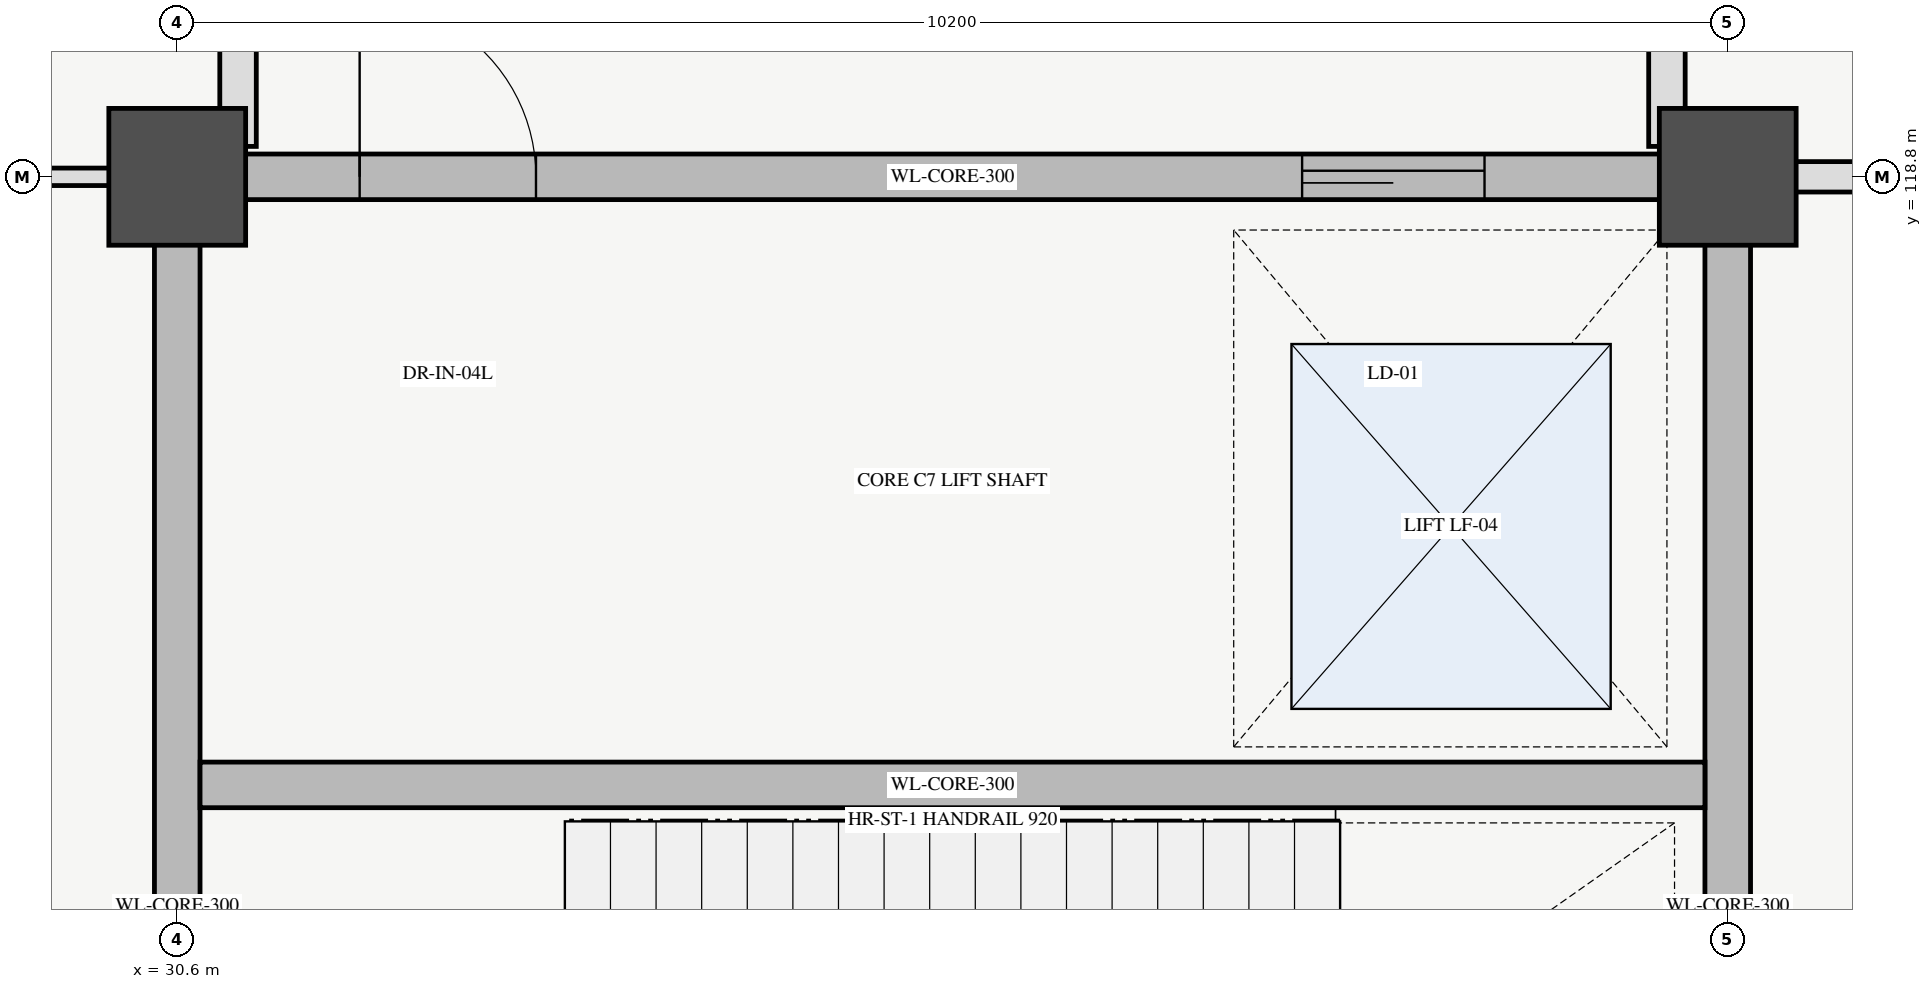
"""IFC4 building model, lengths in metres.
Left out: names, types, materials, properties, quantities, classifications, styles, units other than length and angle.
Written with IfcOpenShell. Run it as: python <this file> out.ifc"""

import sys

from ifc_helpers import new_model, si_unit, direction, frame, frame_2d, origin, origin_2d, place, context, subcontext, project, spatial, rectangle, extrude, element, fill, save


model = new_model("IFC4")
c1 = context("Model", 3, precision=1e-05, world=origin(), true_north=direction((0.0, 1.0)))
c2 = subcontext(c1, "Body", "Model", "MODEL_VIEW")
j1 = project(units=[si_unit("LENGTHUNIT", "METRE"), si_unit("PLANEANGLEUNIT", "RADIAN")], contexts=[c1])
p1 = place(None, origin())
s1 = spatial("IfcSite", under=j1, at=p1, CompositionType="ELEMENT")
p2 = place(p1, origin())
s2 = spatial("IfcBuilding", under=s1, at=p2, CompositionType="ELEMENT")
p3 = place(p2, frame((0.0, 0.0, 5.4)))
s3 = spatial("IfcBuildingStorey", under=s2, at=p3, CompositionType="ELEMENT", Elevation=5.4)
for number, where, z_axis, x_axis in (
    (1, (30.6, 118.8, 0.0), (0.0, 0.0, 1.0), (1.0, 0.0, 0.0)),
    (2, (40.8, 118.8, 0.0), (0.0, 0.0, 1.0), (1.0, 0.0, 0.0)),
):
    element("IfcColumn", number, at=place(p3, frame(where, z_axis=z_axis, x_axis=x_axis)), inside=s3, PredefinedType="COLUMN", context=c2, shape_type="SweptSolid", body=[
        extrude(rectangle(XDim=0.9, YDim=0.9, at=origin_2d()), origin(), (0.0, 0.0, 1.0), 5.4),
    ])
p4 = place(p3, frame((30.6, 118.8, 0.0), z_axis=(0.0, 0.0, 1.0), x_axis=(1.0, 0.0, 0.0)))
e3 = element("IfcWall", 3, at=p4, inside=s3, PredefinedType="SHEAR", context=c2, shape_type="SweptSolid", body=[
    extrude(rectangle(XDim=10.2, YDim=0.3, at=frame_2d((5.1, 0.0))), origin(), (0.0, 0.0, 1.0), 5.4),
])
p5 = place(p4, frame((1.2, 0.0, 0.0)))
e4 = element("IfcOpeningElement", 4, at=p5, cuts=e3, PredefinedType="OPENING", context=c2, shape_type="SweptSolid", body=[
    extrude(rectangle(XDim=1.16, YDim=2.2, at=frame_2d((0.58, 1.1))), frame((0.0, 0.16, 0.0), z_axis=(0.0, -1.0, 0.0), x_axis=(1.0, 0.0, 0.0)), (0.0, 0.0, 1.0), 0.32),
])
p6 = place(p4, frame((7.4, 0.0, 0.0)))
e5 = element("IfcOpeningElement", 5, at=p6, cuts=e3, PredefinedType="OPENING", context=c2, shape_type="SweptSolid", body=[
    extrude(rectangle(XDim=1.2, YDim=2.25, at=frame_2d((0.6, 1.125))), frame((0.0, 0.16, 0.0), z_axis=(0.0, -1.0, 0.0), x_axis=(1.0, 0.0, 0.0)), (0.0, 0.0, 1.0), 0.32),
])
for number, where, z_axis, x_axis in (
    (6, (30.6, 109.2, 0.0), (0.0, 0.0, 1.0), (0.0, 1.0, 0.0)),
    (7, (40.8, 109.2, 0.0), (0.0, 0.0, 1.0), (0.0, 1.0, 0.0)),
):
    element("IfcWall", number, at=place(p3, frame(where, z_axis=z_axis, x_axis=x_axis)), inside=s3, PredefinedType="SHEAR", context=c2, shape_type="SweptSolid", body=[
        extrude(rectangle(XDim=9.6, YDim=0.3, at=frame_2d((4.8, 0.0))), origin(), (0.0, 0.0, 1.0), 5.4),
    ])
p7 = place(p3, frame((30.75, 114.8, 0.0), z_axis=(0.0, 0.0, 1.0), x_axis=(1.0, 0.0, 0.0)))
e8 = element("IfcWall", 8, at=p7, inside=s3, PredefinedType="SHEAR", context=c2, shape_type="SweptSolid", body=[
    extrude(rectangle(XDim=9.9, YDim=0.3, at=frame_2d((4.95, 0.0))), origin(), (0.0, 0.0, 1.0), 5.4),
])
for number, where, z_axis, x_axis in (
    (9, (40.4, 119.0, 0.0), (0.0, 0.0, 1.0), (0.0, 1.0, 0.0)),
    (10, (31.0, 119.0, 0.0), (0.0, 0.0, 1.0), (0.0, 1.0, 0.0)),
):
    element("IfcWall", number, at=place(p3, frame(where, z_axis=z_axis, x_axis=x_axis)), inside=s3, PredefinedType="PARTITIONING", context=c2, shape_type="SweptSolid", body=[
        extrude(rectangle(XDim=4.6, YDim=0.24, at=frame_2d((2.3, 0.0))), origin(), (0.0, 0.0, 1.0), 4.2),
    ])
p8 = place(p3, frame((41.2, 118.8, 0.0), z_axis=(0.0, 0.0, 1.0), x_axis=(1.0, 0.0, 0.0)))
e11 = element("IfcWall", 11, at=p8, inside=s3, PredefinedType="PARTITIONING", context=c2, shape_type="SweptSolid", body=[
    extrude(rectangle(XDim=9.4, YDim=0.2, at=frame_2d((4.7, 0.0))), origin(), (0.0, 0.0, 1.0), 4.2),
])
p9 = place(p8, frame((4.22, 0.0, 0.0)))
e12 = element("IfcOpeningElement", 12, at=p9, cuts=e11, PredefinedType="OPENING", context=c2, shape_type="SweptSolid", body=[
    extrude(rectangle(XDim=0.96, YDim=2.1, at=frame_2d((0.48, 1.05))), frame((0.0, 0.11, 0.0), z_axis=(0.0, -1.0, 0.0), x_axis=(1.0, 0.0, 0.0)), (0.0, 0.0, 1.0), 0.22),
])
p10 = place(p3, frame((20.8, 118.8, 0.0), z_axis=(0.0, 0.0, 1.0), x_axis=(1.0, 0.0, 0.0)))
e13 = element("IfcWall", 13, at=p10, inside=s3, PredefinedType="PARTITIONING", context=c2, shape_type="SweptSolid", body=[
    extrude(rectangle(XDim=9.4, YDim=0.115, at=frame_2d((4.7, 0.0))), origin(), (0.0, 0.0, 1.0), 4.2),
])
p11 = place(p10, frame((4.26, 0.0, 0.0)))
e14 = element("IfcOpeningElement", 14, at=p11, cuts=e13, PredefinedType="OPENING", context=c2, shape_type="SweptSolid", body=[
    extrude(rectangle(XDim=0.88, YDim=2.08, at=frame_2d((0.44, 1.04))), frame((0.0, 0.067, 0.0), z_axis=(0.0, -1.0, 0.0), x_axis=(1.0, 0.0, 0.0)), (0.0, 0.0, 1.0), 0.135),
])
p12 = place(p5, origin())
e15 = element("IfcDoor", 15, at=p12, inside=s3, OperationType="SINGLE_SWING_LEFT", PredefinedType="DOOR", context=c2, shape_type="SweptSolid", body=[
    extrude(rectangle(XDim=1.16, YDim=2.2, at=frame_2d((0.58, 1.1))), frame((0.0, 0.025, 0.0), z_axis=(0.0, -1.0, 0.0), x_axis=(1.0, 0.0, 0.0)), (0.0, 0.0, 1.0), 0.05),
])
fill(e4, e15)
p13 = place(p6, origin())
e16 = element("IfcDoor", 16, at=p13, inside=s3, OperationType="SLIDING_TO_LEFT", PredefinedType="DOOR", context=c2, shape_type="SweptSolid", body=[
    extrude(rectangle(XDim=1.2, YDim=2.25, at=frame_2d((0.6, 1.125))), frame((0.0, 0.025, 0.0), z_axis=(0.0, -1.0, 0.0), x_axis=(1.0, 0.0, 0.0)), (0.0, 0.0, 1.0), 0.05),
])
fill(e5, e16)
save(model, sys.argv[1])
